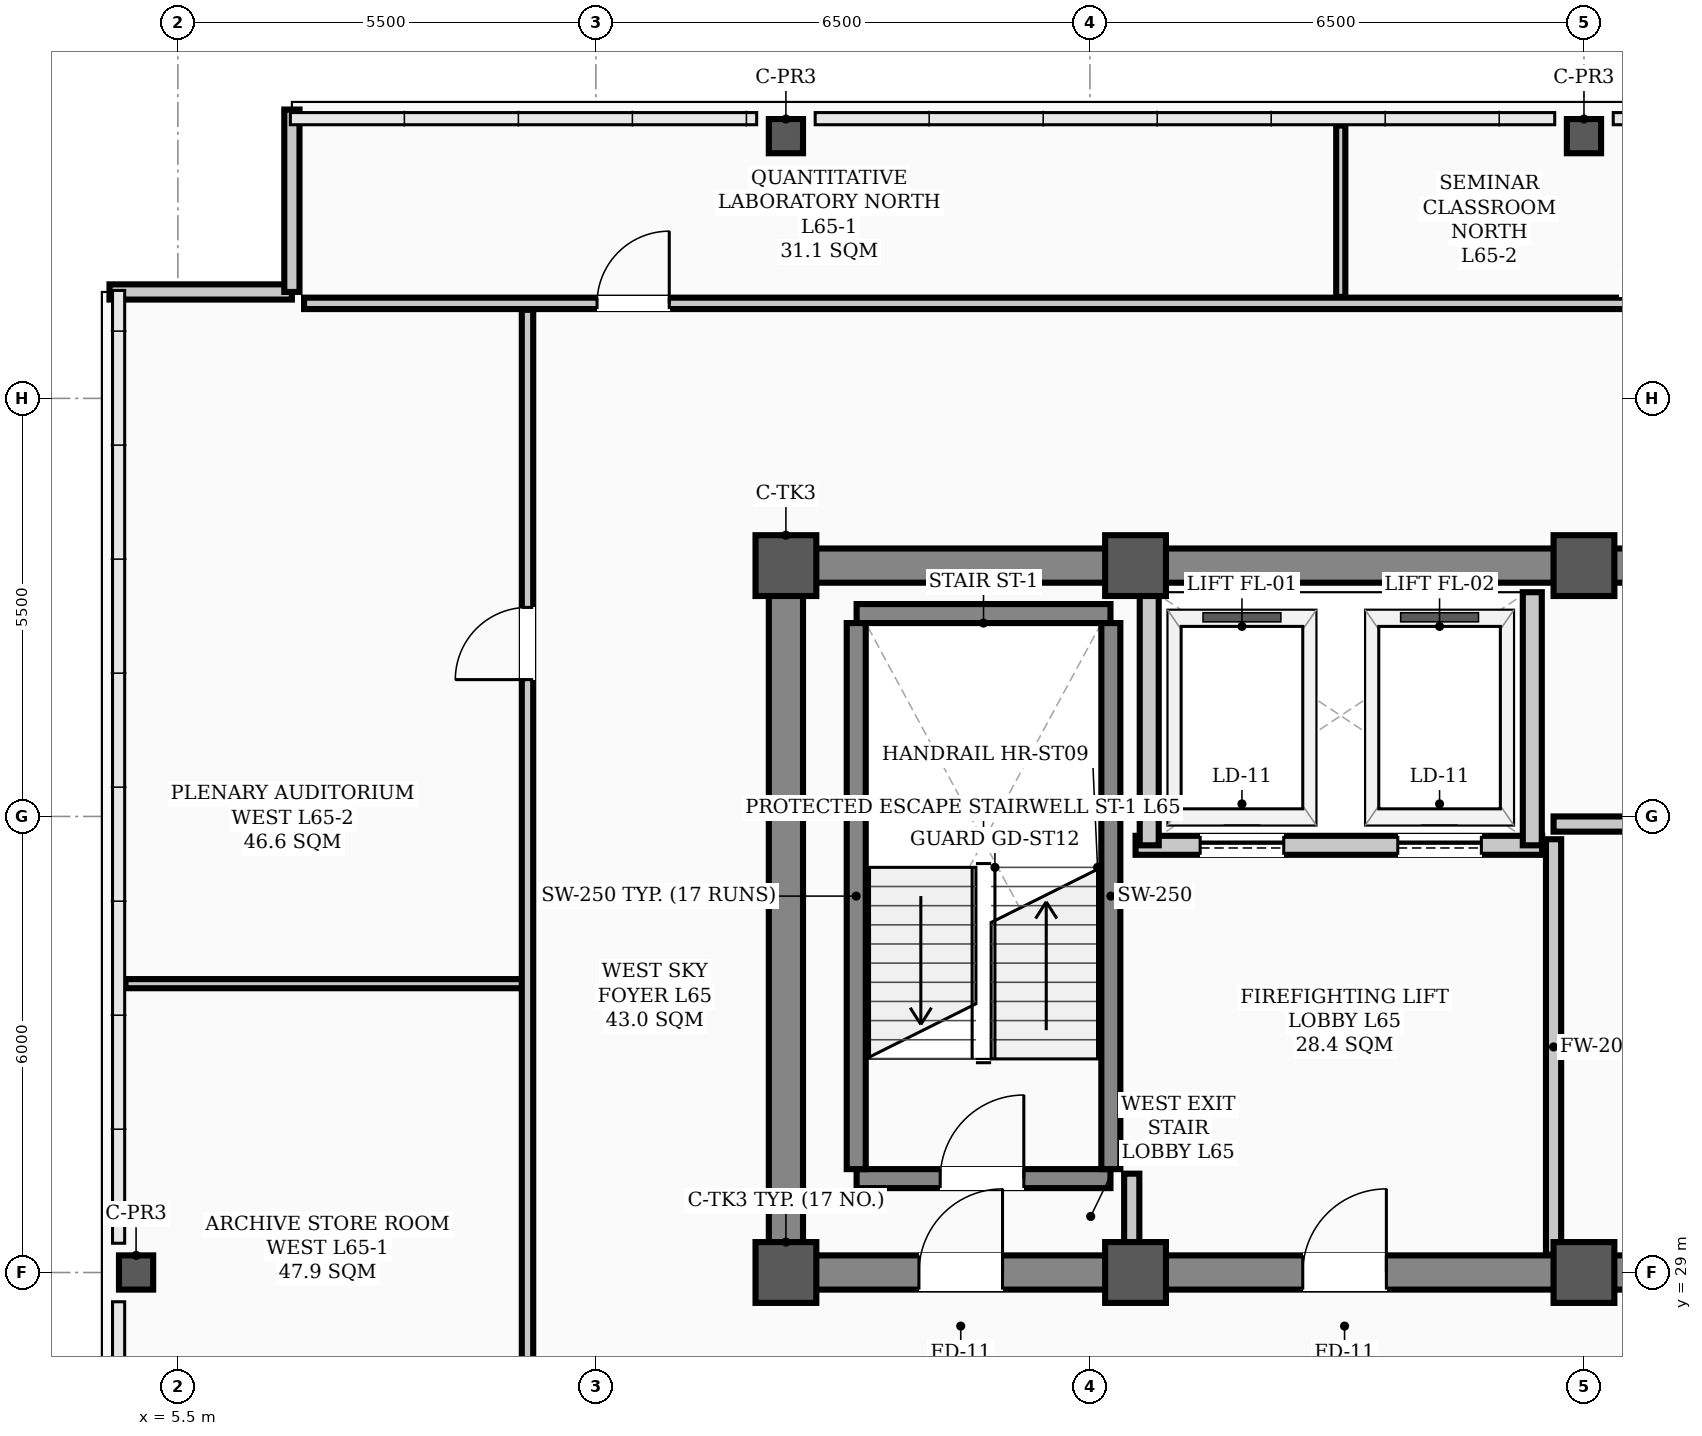
"""IFC4 building model, lengths in metres.
Left out: names, types, materials, properties, quantities, classifications, styles, units other than length and angle.
Written with IfcOpenShell. Run it as: python <this file> out.ifc"""

import sys

from ifc_helpers import new_model, si_unit, direction, frame, frame_2d, origin, origin_2d, place, context, subcontext, project, spatial, rectangle, hollow_rectangle, extrude, element, fill, save


model = new_model("IFC4")
c1 = context("Model", 3, precision=1e-05, world=origin(), true_north=direction((0.0, 1.0)))
c2 = subcontext(c1, "Body", "Model", "MODEL_VIEW")
j1 = project(units=[si_unit("LENGTHUNIT", "METRE"), si_unit("PLANEANGLEUNIT", "RADIAN")], contexts=[c1])
p1 = place(None, origin())
s1 = spatial("IfcSite", under=j1, at=p1, CompositionType="ELEMENT")
p2 = place(p1, origin())
s2 = spatial("IfcBuilding", under=s1, at=p2, CompositionType="ELEMENT")
p3 = place(p2, frame((0.0, 0.0, 261.8)))
s3 = spatial("IfcBuildingStorey", under=s2, at=p3, CompositionType="ELEMENT", Elevation=261.8)
for number, where, z_axis, x_axis in (
    (1, (13.5, 29.0, 0.0), (0.0, 0.0, 1.0), (1.0, 0.0, 0.0)),
    (2, (13.5, 38.3, 0.0), (0.0, 0.0, 1.0), (1.0, 0.0, 0.0)),
    (3, (18.1, 29.0, 0.0), (0.0, 0.0, 1.0), (1.0, 0.0, 0.0)),
    (4, (18.1, 38.3, 0.0), (0.0, 0.0, 1.0), (1.0, 0.0, 0.0)),
    (5, (24.0, 29.0, 0.0), (0.0, 0.0, 1.0), (1.0, 0.0, 0.0)),
    (6, (24.0, 38.3, 0.0), (0.0, 0.0, 1.0), (1.0, 0.0, 0.0)),
):
    element("IfcColumn", number, at=place(p3, frame(where, z_axis=z_axis, x_axis=x_axis)), inside=s3, PredefinedType="COLUMN", context=c2, shape_type="SweptSolid", body=[
        extrude(hollow_rectangle(XDim=0.8, YDim=0.8, WallThickness=0.032, InnerFilletRadius=0.016, OuterFilletRadius=0.048, at=origin_2d()), origin(), (0.0, 0.0, 1.0), 3.9),
    ])
for number, where, z_axis, x_axis in (
    (7, (4.95, 29.0, 0.0), (0.0, 0.0, 1.0), (1.0, 0.0, 0.0)),
    (8, (13.5, 43.95, 0.0), (0.0, 0.0, 1.0), (1.0, 0.0, 0.0)),
    (9, (24.0, 43.95, 0.0), (0.0, 0.0, 1.0), (1.0, 0.0, 0.0)),
):
    element("IfcColumn", number, at=place(p3, frame(where, z_axis=z_axis, x_axis=x_axis)), inside=s3, PredefinedType="COLUMN", context=c2, shape_type="SweptSolid", body=[
        extrude(hollow_rectangle(XDim=0.45, YDim=0.45, WallThickness=0.022, InnerFilletRadius=0.022, OuterFilletRadius=0.044, at=origin_2d()), origin(), (0.0, 0.0, 1.0), 3.9),
    ])
p4 = place(p3, frame((4.6, 41.9, 0.0), z_axis=(0.0, 0.0, 1.0), x_axis=(1.0, 0.0, 0.0)))
e10 = element("IfcWall", 10, at=p4, inside=s3, PredefinedType="PARAPET", context=c2, shape_type="SweptSolid", body=[
    extrude(rectangle(XDim=2.4, YDim=0.2, at=frame_2d((1.2, 0.0))), origin(), (0.0, 0.0, 1.0), 1.2),
])
p5 = place(p3, frame((7.0, 41.9, 0.0), z_axis=(0.0, 0.0, 1.0), x_axis=(0.0, 1.0, 0.0)))
e11 = element("IfcWall", 11, at=p5, inside=s3, PredefinedType="PARAPET", context=c2, shape_type="SweptSolid", body=[
    extrude(rectangle(XDim=2.4, YDim=0.2, at=frame_2d((1.2, 0.0))), origin(), (0.0, 0.0, 1.0), 1.2),
])
p6 = place(p3, frame((13.5, 29.0, 0.0), z_axis=(0.0, 0.0, 1.0), x_axis=(1.0, 0.0, 0.0)))
e12 = element("IfcWall", 12, at=p6, inside=s3, PredefinedType="SHEAR", context=c2, shape_type="SweptSolid", body=[
    extrude(rectangle(XDim=30.5, YDim=0.45, at=frame_2d((15.25, 0.0))), origin(), (0.0, 0.0, 1.0), 3.72),
])
p7 = place(p6, frame((1.75, 0.0, 0.0)))
e13 = element("IfcOpeningElement", 13, at=p7, cuts=e12, PredefinedType="OPENING", context=c2, shape_type="SweptSolid", body=[
    extrude(rectangle(XDim=1.1, YDim=2.08, at=frame_2d((0.55, 1.04))), frame((0.0, 0.235, 0.0), z_axis=(0.0, -1.0, 0.0), x_axis=(1.0, 0.0, 0.0)), (0.0, 0.0, 1.0), 0.47),
])
p8 = place(p6, frame((26.7, 0.0, 0.0)))
e14 = element("IfcOpeningElement", 14, at=p8, cuts=e12, PredefinedType="OPENING", context=c2, shape_type="SweptSolid", body=[
    extrude(rectangle(XDim=1.1, YDim=2.08, at=frame_2d((0.55, 1.04))), frame((0.0, 0.235, 0.0), z_axis=(0.0, -1.0, 0.0), x_axis=(1.0, 0.0, 0.0)), (0.0, 0.0, 1.0), 0.47),
])
p9 = place(p6, frame((6.8, 0.0, 0.0)))
e15 = element("IfcOpeningElement", 15, at=p9, cuts=e12, PredefinedType="OPENING", context=c2, shape_type="SweptSolid", body=[
    extrude(rectangle(XDim=1.1, YDim=2.08, at=frame_2d((0.55, 1.04))), frame((0.0, 0.235, 0.0), z_axis=(0.0, -1.0, 0.0), x_axis=(1.0, 0.0, 0.0)), (0.0, 0.0, 1.0), 0.47),
])
p10 = place(p6, frame((13.2, 0.0, 0.0)))
e16 = element("IfcOpeningElement", 16, at=p10, cuts=e12, PredefinedType="OPENING", context=c2, shape_type="SweptSolid", body=[
    extrude(rectangle(XDim=1.6, YDim=2.08, at=frame_2d((0.8, 1.04))), frame((0.0, 0.235, 0.0), z_axis=(0.0, -1.0, 0.0), x_axis=(1.0, 0.0, 0.0)), (0.0, 0.0, 1.0), 0.47),
])
p11 = place(p6, frame((19.5, 0.0, 0.0)))
e17 = element("IfcOpeningElement", 17, at=p11, cuts=e12, PredefinedType="OPENING", context=c2, shape_type="SweptSolid", body=[
    extrude(rectangle(XDim=0.9, YDim=2.08, at=frame_2d((0.45, 1.04))), frame((0.0, 0.235, 0.0), z_axis=(0.0, -1.0, 0.0), x_axis=(1.0, 0.0, 0.0)), (0.0, 0.0, 1.0), 0.47),
])
p12 = place(p6, frame((21.55, 0.0, 0.0)))
e18 = element("IfcOpeningElement", 18, at=p12, cuts=e12, PredefinedType="OPENING", context=c2, shape_type="SweptSolid", body=[
    extrude(rectangle(XDim=0.9, YDim=2.08, at=frame_2d((0.45, 1.04))), frame((0.0, 0.235, 0.0), z_axis=(0.0, -1.0, 0.0), x_axis=(1.0, 0.0, 0.0)), (0.0, 0.0, 1.0), 0.47),
])
p13 = place(p3, frame((13.5, 38.3, 0.0), z_axis=(0.0, 0.0, 1.0), x_axis=(1.0, 0.0, 0.0)))
e19 = element("IfcWall", 19, at=p13, inside=s3, PredefinedType="SHEAR", context=c2, shape_type="SweptSolid", body=[
    extrude(rectangle(XDim=30.5, YDim=0.45, at=frame_2d((15.25, 0.0))), origin(), (0.0, 0.0, 1.0), 3.72),
])
p14 = place(p3, frame((13.5, 29.35, 0.0), z_axis=(0.0, 0.0, 1.0), x_axis=(0.0, 1.0, 0.0)))
e20 = element("IfcWall", 20, at=p14, inside=s3, PredefinedType="SHEAR", context=c2, shape_type="SweptSolid", body=[
    extrude(rectangle(XDim=8.6, YDim=0.45, at=frame_2d((4.3, 0.0))), origin(), (0.0, 0.0, 1.0), 3.72),
])
p15 = place(p3, frame((14.43, 30.235, 0.0), z_axis=(0.0, 0.0, 1.0), x_axis=(1.0, 0.0, 0.0)))
e21 = element("IfcWall", 21, at=p15, inside=s3, PredefinedType="STANDARD", context=c2, shape_type="SweptSolid", body=[
    extrude(rectangle(XDim=3.34, YDim=0.25, at=frame_2d((1.67, 0.0))), origin(), (0.0, 0.0, 1.0), 3.72),
])
p16 = place(p15, frame((1.1, 0.0, 0.0)))
e22 = element("IfcOpeningElement", 22, at=p16, cuts=e21, PredefinedType="OPENING", context=c2, shape_type="SweptSolid", body=[
    extrude(rectangle(XDim=1.1, YDim=2.08, at=frame_2d((0.55, 1.04))), frame((0.0, 0.135, 0.0), z_axis=(0.0, -1.0, 0.0), x_axis=(1.0, 0.0, 0.0)), (0.0, 0.0, 1.0), 0.27),
])
p17 = place(p3, frame((14.43, 37.669, 0.0), z_axis=(0.0, 0.0, 1.0), x_axis=(1.0, 0.0, 0.0)))
e23 = element("IfcWall", 23, at=p17, inside=s3, PredefinedType="STANDARD", context=c2, shape_type="SweptSolid", body=[
    extrude(rectangle(XDim=3.34, YDim=0.25, at=frame_2d((1.67, 0.0))), origin(), (0.0, 0.0, 1.0), 3.72),
])
for number, where, z_axis, x_axis in (
    (24, (14.425, 30.36, 0.0), (0.0, 0.0, 1.0), (0.0, 1.0, 0.0)),
    (25, (17.775, 30.36, 0.0), (0.0, 0.0, 1.0), (0.0, 1.0, 0.0)),
):
    element("IfcWall", number, at=place(p3, frame(where, z_axis=z_axis, x_axis=x_axis)), inside=s3, PredefinedType="STANDARD", context=c2, shape_type="SweptSolid", body=[
        extrude(rectangle(XDim=7.184, YDim=0.25, at=frame_2d((3.592, 0.0))), origin(), (0.0, 0.0, 1.0), 3.72),
    ])
p18 = place(p3, frame((18.1, 34.62, 0.0), z_axis=(0.0, 0.0, 1.0), x_axis=(1.0, 0.0, 0.0)))
e26 = element("IfcWall", 26, at=p18, inside=s3, PredefinedType="STANDARD", context=c2, shape_type="SweptSolid", body=[
    extrude(rectangle(XDim=5.35, YDim=0.25, at=frame_2d((2.675, 0.0))), origin(), (0.0, 0.0, 1.0), 3.72),
])
p19 = place(p18, frame((0.85, 0.0, 0.0)))
e27 = element("IfcOpeningElement", 27, at=p19, cuts=e26, PredefinedType="OPENING", context=c2, shape_type="SweptSolid", body=[
    extrude(rectangle(XDim=1.1, YDim=2.08, at=frame_2d((0.55, 1.04))), frame((0.0, 0.135, 0.0), z_axis=(0.0, -1.0, 0.0), x_axis=(1.0, 0.0, 0.0)), (0.0, 0.0, 1.0), 0.27),
])
p20 = place(p18, frame((3.45, 0.0, 0.0)))
e28 = element("IfcOpeningElement", 28, at=p20, cuts=e26, PredefinedType="OPENING", context=c2, shape_type="SweptSolid", body=[
    extrude(rectangle(XDim=1.1, YDim=2.08, at=frame_2d((0.55, 1.04))), frame((0.0, 0.135, 0.0), z_axis=(0.0, -1.0, 0.0), x_axis=(1.0, 0.0, 0.0)), (0.0, 0.0, 1.0), 0.27),
])
for number, where, z_axis, x_axis in (
    (29, (18.28, 34.62, 0.0), (0.0, 0.0, 1.0), (0.0, 1.0, 0.0)),
    (30, (23.32, 34.62, 0.0), (0.0, 0.0, 1.0), (0.0, 1.0, 0.0)),
):
    element("IfcWall", number, at=place(p3, frame(where, z_axis=z_axis, x_axis=x_axis)), inside=s3, PredefinedType="STANDARD", context=c2, shape_type="SweptSolid", body=[
        extrude(rectangle(XDim=3.33, YDim=0.25, at=frame_2d((1.665, 0.0))), origin(), (0.0, 0.0, 1.0), 3.4),
    ])
p21 = place(p3, frame((23.6, 34.9, 0.0), z_axis=(0.0, 0.0, 1.0), x_axis=(1.0, 0.0, 0.0)))
e31 = element("IfcWall", 31, at=p21, inside=s3, PredefinedType="STANDARD", context=c2, shape_type="SweptSolid", body=[
    extrude(rectangle(XDim=8.18, YDim=0.2, at=frame_2d((4.09, 0.0))), origin(), (0.0, 0.0, 1.0), 3.72),
])
p22 = place(p21, frame((3.45, 0.0, 0.0)))
e32 = element("IfcOpeningElement", 32, at=p22, cuts=e31, PredefinedType="OPENING", context=c2, shape_type="SweptSolid", body=[
    extrude(rectangle(XDim=1.1, YDim=2.08, at=frame_2d((0.55, 1.04))), frame((0.0, 0.11, 0.0), z_axis=(0.0, -1.0, 0.0), x_axis=(1.0, 0.0, 0.0)), (0.0, 0.0, 1.0), 0.22),
])
p23 = place(p3, frame((4.81, 32.8, 0.0), z_axis=(0.0, 0.0, 1.0), x_axis=(1.0, 0.0, 0.0)))
e33 = element("IfcWall", 33, at=p23, inside=s3, PredefinedType="PARTITIONING", context=c2, shape_type="SweptSolid", body=[
    extrude(rectangle(XDim=5.29, YDim=0.12, at=frame_2d((2.645, 0.0))), origin(), (0.0, 0.0, 1.0), 3.72),
])
p24 = place(p3, frame((7.16, 41.75, 0.0), z_axis=(0.0, 0.0, 1.0), x_axis=(1.0, 0.0, 0.0)))
e34 = element("IfcWall", 34, at=p24, inside=s3, PredefinedType="PARTITIONING", context=c2, shape_type="SweptSolid", body=[
    extrude(rectangle(XDim=36.18, YDim=0.15, at=frame_2d((18.09, 0.0))), origin(), (0.0, 0.0, 1.0), 3.2),
])
p25 = place(p24, frame((3.855, 0.0, 0.0)))
e35 = element("IfcOpeningElement", 35, at=p25, cuts=e34, PredefinedType="OPENING", context=c2, shape_type="SweptSolid", body=[
    extrude(rectangle(XDim=0.95, YDim=2.08, at=frame_2d((0.475, 1.04))), frame((0.0, 0.085, 0.0), z_axis=(0.0, -1.0, 0.0), x_axis=(1.0, 0.0, 0.0)), (0.0, 0.0, 1.0), 0.17),
])
p26 = place(p24, frame((18.665, 0.0, 0.0)))
e36 = element("IfcOpeningElement", 36, at=p26, cuts=e34, PredefinedType="OPENING", context=c2, shape_type="SweptSolid", body=[
    extrude(rectangle(XDim=0.95, YDim=2.08, at=frame_2d((0.475, 1.04))), frame((0.0, 0.085, 0.0), z_axis=(0.0, -1.0, 0.0), x_axis=(1.0, 0.0, 0.0)), (0.0, 0.0, 1.0), 0.17),
])
p27 = place(p24, frame((26.765, 0.0, 0.0)))
e37 = element("IfcOpeningElement", 37, at=p27, cuts=e34, PredefinedType="OPENING", context=c2, shape_type="SweptSolid", body=[
    extrude(rectangle(XDim=0.95, YDim=2.08, at=frame_2d((0.475, 1.04))), frame((0.0, 0.085, 0.0), z_axis=(0.0, -1.0, 0.0), x_axis=(1.0, 0.0, 0.0)), (0.0, 0.0, 1.0), 0.17),
])
p28 = place(p24, frame((33.765, 0.0, 0.0)))
e38 = element("IfcOpeningElement", 38, at=p28, cuts=e34, PredefinedType="OPENING", context=c2, shape_type="SweptSolid", body=[
    extrude(rectangle(XDim=0.95, YDim=2.08, at=frame_2d((0.475, 1.04))), frame((0.0, 0.085, 0.0), z_axis=(0.0, -1.0, 0.0), x_axis=(1.0, 0.0, 0.0)), (0.0, 0.0, 1.0), 0.17),
])
p29 = place(p3, frame((18.05, 29.235, 0.0), z_axis=(0.0, 0.0, 1.0), x_axis=(0.0, 1.0, 0.0)))
e39 = element("IfcWall", 39, at=p29, inside=s3, PredefinedType="STANDARD", context=c2, shape_type="SweptSolid", body=[
    extrude(rectangle(XDim=1.065, YDim=0.2, at=frame_2d((0.532, 0.0))), origin(), (0.0, 0.0, 1.0), 3.4),
])
p30 = place(p3, frame((23.6, 29.235, 0.0), z_axis=(0.0, 0.0, 1.0), x_axis=(0.0, 1.0, 0.0)))
e40 = element("IfcWall", 40, at=p30, inside=s3, PredefinedType="STANDARD", context=c2, shape_type="SweptSolid", body=[
    extrude(rectangle(XDim=5.465, YDim=0.2, at=frame_2d((2.732, 0.0))), origin(), (0.0, 0.0, 1.0), 3.2),
])
p31 = place(p3, frame((10.1, 23.785, 0.0), z_axis=(0.0, 0.0, 1.0), x_axis=(0.0, 1.0, 0.0)))
e41 = element("IfcWall", 41, at=p31, inside=s3, PredefinedType="PARTITIONING", context=c2, shape_type="SweptSolid", body=[
    extrude(rectangle(XDim=17.88, YDim=0.15, at=frame_2d((8.94, 0.0))), origin(), (0.0, 0.0, 1.0), 3.1),
])
p32 = place(p31, frame((0.64, 0.0, 0.0)))
e42 = element("IfcOpeningElement", 42, at=p32, cuts=e41, PredefinedType="OPENING", context=c2, shape_type="SweptSolid", body=[
    extrude(rectangle(XDim=0.95, YDim=2.08, at=frame_2d((0.475, 1.04))), frame((0.0, 0.085, 0.0), z_axis=(0.0, -1.0, 0.0), x_axis=(1.0, 0.0, 0.0)), (0.0, 0.0, 1.0), 0.17),
])
p33 = place(p31, frame((13.015, 0.0, 0.0)))
e43 = element("IfcOpeningElement", 43, at=p33, cuts=e41, PredefinedType="OPENING", context=c2, shape_type="SweptSolid", body=[
    extrude(rectangle(XDim=0.95, YDim=2.08, at=frame_2d((0.475, 1.04))), frame((0.0, 0.085, 0.0), z_axis=(0.0, -1.0, 0.0), x_axis=(1.0, 0.0, 0.0)), (0.0, 0.0, 1.0), 0.17),
])
p34 = place(p3, frame((20.8, 41.835, 0.0), z_axis=(0.0, 0.0, 1.0), x_axis=(0.0, 1.0, 0.0)))
e44 = element("IfcWall", 44, at=p34, inside=s3, PredefinedType="PARTITIONING", context=c2, shape_type="SweptSolid", body=[
    extrude(rectangle(XDim=2.255, YDim=0.12, at=frame_2d((1.127, 0.0))), origin(), (0.0, 0.0, 1.0), 3.212),
])
p35 = place(p16, origin())
e45 = element("IfcDoor", 45, at=p35, inside=s3, OperationType="SINGLE_SWING_RIGHT", PredefinedType="DOOR", context=c2, shape_type="SweptSolid", body=[
    extrude(rectangle(XDim=1.1, YDim=2.08, at=frame_2d((0.55, 1.04))), frame((0.0, 0.025, 0.0), z_axis=(0.0, -1.0, 0.0), x_axis=(1.0, 0.0, 0.0)), (0.0, 0.0, 1.0), 0.05),
])
fill(e22, e45)
p36 = place(p7, origin())
e46 = element("IfcDoor", 46, at=p36, inside=s3, OperationType="SINGLE_SWING_RIGHT", PredefinedType="DOOR", context=c2, shape_type="SweptSolid", body=[
    extrude(rectangle(XDim=1.1, YDim=2.08, at=frame_2d((0.55, 1.04))), frame((0.0, 0.025, 0.0), z_axis=(0.0, -1.0, 0.0), x_axis=(1.0, 0.0, 0.0)), (0.0, 0.0, 1.0), 0.05),
])
fill(e13, e46)
p37 = place(p9, origin())
e47 = element("IfcDoor", 47, at=p37, inside=s3, OperationType="SINGLE_SWING_RIGHT", PredefinedType="DOOR", context=c2, shape_type="SweptSolid", body=[
    extrude(rectangle(XDim=1.1, YDim=2.08, at=frame_2d((0.55, 1.04))), frame((0.0, 0.025, 0.0), z_axis=(0.0, -1.0, 0.0), x_axis=(1.0, 0.0, 0.0)), (0.0, 0.0, 1.0), 0.05),
])
fill(e15, e47)
p38 = place(p33, origin())
e48 = element("IfcDoor", 48, at=p38, inside=s3, OperationType="SINGLE_SWING_LEFT", PredefinedType="DOOR", context=c2, shape_type="SweptSolid", body=[
    extrude(rectangle(XDim=0.95, YDim=2.08, at=frame_2d((0.475, 1.04))), frame((0.0, 0.025, 0.0), z_axis=(0.0, -1.0, 0.0), x_axis=(1.0, 0.0, 0.0)), (0.0, 0.0, 1.0), 0.05),
])
fill(e43, e48)
p39 = place(p25, origin())
e49 = element("IfcDoor", 49, at=p39, inside=s3, OperationType="SINGLE_SWING_RIGHT", PredefinedType="DOOR", context=c2, shape_type="SweptSolid", body=[
    extrude(rectangle(XDim=0.95, YDim=2.08, at=frame_2d((0.475, 1.04))), frame((0.0, 0.025, 0.0), z_axis=(0.0, -1.0, 0.0), x_axis=(1.0, 0.0, 0.0)), (0.0, 0.0, 1.0), 0.05),
])
fill(e35, e49)
p40 = place(p19, origin())
e50 = element("IfcDoor", 50, at=p40, inside=s3, OperationType="SLIDING_TO_LEFT", PredefinedType="DOOR", context=c2, shape_type="SweptSolid", body=[
    extrude(rectangle(XDim=1.1, YDim=2.08, at=frame_2d((0.55, 1.04))), frame((0.0, 0.025, 0.0), z_axis=(0.0, -1.0, 0.0), x_axis=(1.0, 0.0, 0.0)), (0.0, 0.0, 1.0), 0.05),
])
fill(e27, e50)
p41 = place(p20, origin())
e51 = element("IfcDoor", 51, at=p41, inside=s3, OperationType="SLIDING_TO_LEFT", PredefinedType="DOOR", context=c2, shape_type="SweptSolid", body=[
    extrude(rectangle(XDim=1.1, YDim=2.08, at=frame_2d((0.55, 1.04))), frame((0.0, 0.025, 0.0), z_axis=(0.0, -1.0, 0.0), x_axis=(1.0, 0.0, 0.0)), (0.0, 0.0, 1.0), 0.05),
])
fill(e28, e51)
save(model, sys.argv[1])
